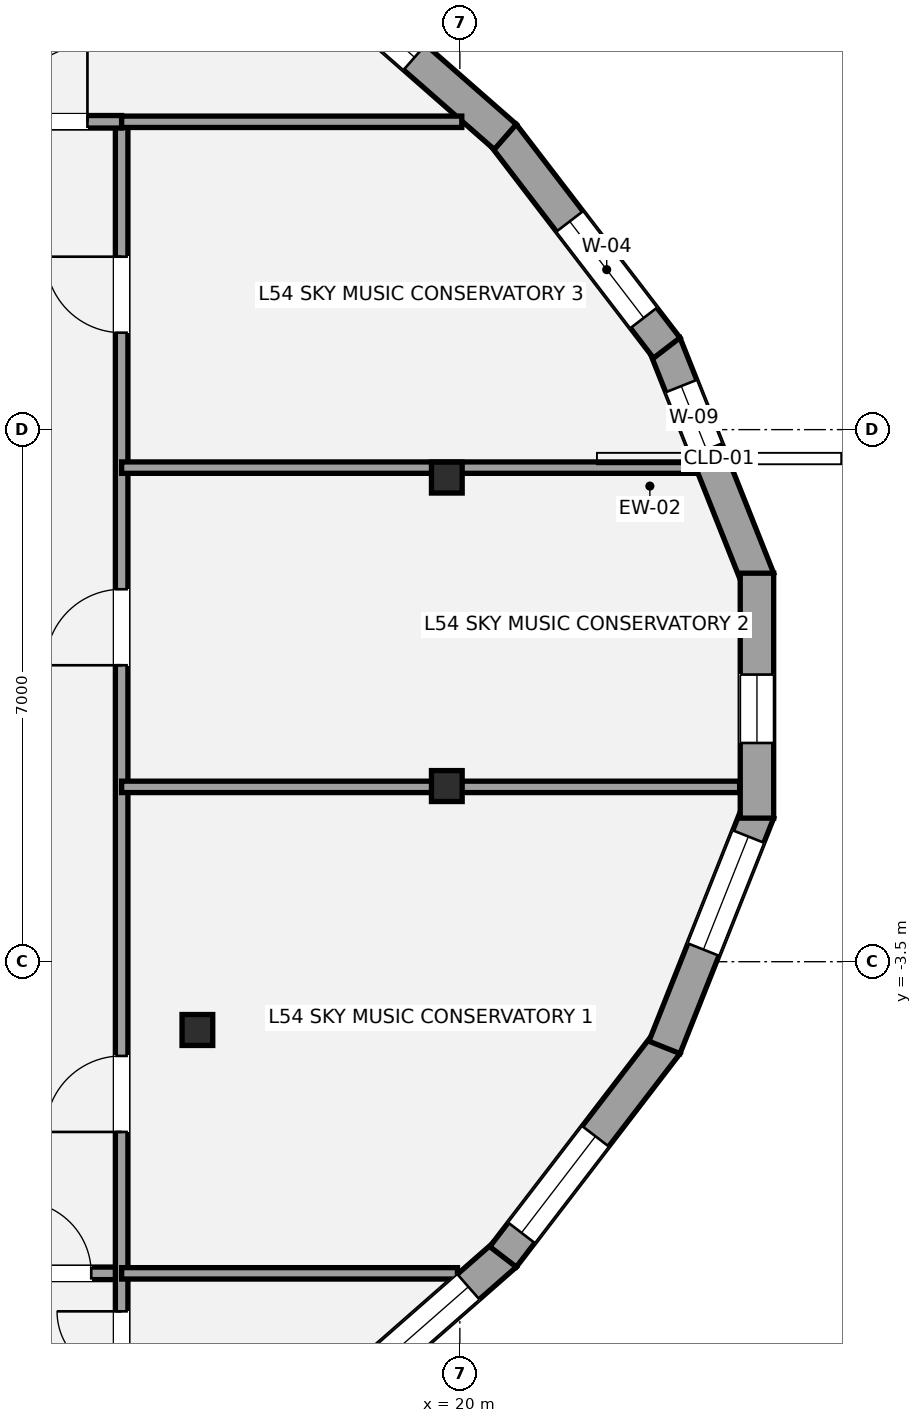
"""IFC4 building model, lengths in metres.
Left out: names, types, materials, properties, quantities, classifications, styles, units other than length and angle.
Written with IfcOpenShell. Run it as: python <this file> out.ifc"""

import sys

from ifc_helpers import new_model, si_unit, direction, frame, frame_2d, origin, origin_2d, place, context, subcontext, project, spatial, rectangle, i_section, extrude, element, fill, save


model = new_model("IFC4")
c1 = context("Model", 3, precision=1e-05, world=origin(), true_north=direction((0.0, 1.0)))
c2 = subcontext(c1, "Body", "Model", "MODEL_VIEW")
j1 = project(units=[si_unit("LENGTHUNIT", "METRE"), si_unit("PLANEANGLEUNIT", "RADIAN")], contexts=[c1])
p1 = place(None, origin())
s1 = spatial("IfcSite", under=j1, at=p1, CompositionType="ELEMENT")
p2 = place(p1, origin())
s2 = spatial("IfcBuilding", under=s1, at=p2, CompositionType="ELEMENT")
p3 = place(p2, frame((0.0, 0.0, 195.0)))
s3 = spatial("IfcBuildingStorey", under=s2, at=p3, CompositionType="ELEMENT", Elevation=195.0)
for number, where, z_axis, x_axis in (
    (1, (19.828, 2.869, 0.0), (0.0, 0.0, 1.0), (1.0, 0.0, 0.0)),
    (2, (16.547, -4.398, 0.0), (0.0, 0.0, 1.0), (1.0, 0.0, 0.0)),
    (3, (19.828, -1.189, 0.0), (0.0, 0.0, 1.0), (1.0, 0.0, 0.0)),
):
    element("IfcColumn", number, at=place(p3, frame(where, z_axis=z_axis, x_axis=x_axis)), inside=s3, PredefinedType="COLUMN", context=c2, shape_type="SweptSolid", body=[
        extrude(i_section(OverallWidth=0.404, OverallDepth=0.407, WebThickness=0.027, FlangeThickness=0.044, at=origin_2d()), origin(), (0.0, 0.0, 1.0), 3.2),
    ])
p4 = place(p3, frame((22.692, 4.627, 0.0), z_axis=(0.0, 0.0, 1.0), x_axis=(0.369672887509, -0.929161964483, 0.0)))
e4 = element("IfcWall", 4, at=p4, inside=s3, PredefinedType="STANDARD", context=c2, shape_type="SweptSolid", body=[
    extrude(rectangle(XDim=3.334, YDim=0.44, at=frame_2d((1.667, 0.0))), origin(), (0.0, 0.0, 1.0), 2.315),
])
p5 = place(p4, frame((0.597, 0.0, 0.58)))
e5 = element("IfcOpeningElement", 5, at=p5, cuts=e4, PredefinedType="OPENING", context=c2, shape_type="SweptSolid", body=[
    extrude(rectangle(XDim=0.9, YDim=1.35, at=frame_2d((0.45, 0.675))), frame((0.0, 0.23, 0.0), z_axis=(0.0, -1.0, 0.0), x_axis=(1.0, 0.0, 0.0)), (0.0, 0.0, 1.0), 0.46),
])
p6 = place(p3, frame((20.568, 7.383, 0.0), z_axis=(0.0, 0.0, 1.0), x_axis=(0.608586512644, -0.793487527708, 0.0)))
e6 = element("IfcWall", 6, at=p6, inside=s3, PredefinedType="STANDARD", context=c2, shape_type="SweptSolid", body=[
    extrude(rectangle(XDim=3.539, YDim=0.44, at=frame_2d((1.769, 0.0))), origin(), (0.0, 0.0, 1.0), 2.315),
])
p7 = place(p6, frame((1.441, 0.0, 0.58)))
e7 = element("IfcOpeningElement", 7, at=p7, cuts=e6, PredefinedType="OPENING", context=c2, shape_type="SweptSolid", body=[
    extrude(rectangle(XDim=1.6, YDim=1.55, at=frame_2d((0.8, 0.775))), frame((0.0, 0.23, 0.0), z_axis=(0.0, -1.0, 0.0), x_axis=(1.0, 0.0, 0.0)), (0.0, 0.0, 1.0), 0.46),
])
p8 = place(p3, frame((17.79, 9.813, 0.0), z_axis=(0.0, 0.0, 1.0), x_axis=(0.751936480142, -0.65923556475, 0.0)))
e8 = element("IfcWall", 8, at=p8, inside=s3, PredefinedType="STANDARD", context=c2, shape_type="SweptSolid", body=[
    extrude(rectangle(XDim=3.735, YDim=0.44, at=frame_2d((1.867, 0.0))), origin(), (0.0, 0.0, 1.0), 2.315),
])
p9 = place(p8, frame((0.547, 0.0, 0.58)))
e9 = element("IfcOpeningElement", 9, at=p9, cuts=e8, PredefinedType="OPENING", context=c2, shape_type="SweptSolid", body=[
    extrude(rectangle(XDim=1.6, YDim=1.55, at=frame_2d((0.8, 0.775))), frame((0.0, 0.23, 0.0), z_axis=(0.0, -1.0, 0.0), x_axis=(1.0, 0.0, 0.0)), (0.0, 0.0, 1.0), 0.46),
])
p10 = place(p3, frame((20.598, -7.351, 0.0), z_axis=(0.0, 0.0, 1.0), x_axis=(-0.751936480142, -0.65923556475, 0.0)))
e10 = element("IfcWall", 10, at=p10, inside=s3, PredefinedType="STANDARD", context=c2, shape_type="SweptSolid", body=[
    extrude(rectangle(XDim=3.735, YDim=0.44, at=frame_2d((1.867, 0.0))), origin(), (0.0, 0.0, 1.0), 2.315),
])
p11 = place(p10, frame((0.646, 0.0, 0.48)))
e11 = element("IfcOpeningElement", 11, at=p11, cuts=e10, PredefinedType="OPENING", context=c2, shape_type="SweptSolid", body=[
    extrude(rectangle(XDim=1.6, YDim=1.55, at=frame_2d((0.8, 0.775))), frame((0.0, 0.23, 0.0), z_axis=(0.0, -1.0, 0.0), x_axis=(1.0, 0.0, 0.0)), (0.0, 0.0, 1.0), 0.46),
])
p12 = place(p3, frame((22.722, -4.575, 0.0), z_axis=(0.0, 0.0, 1.0), x_axis=(-0.608586512644, -0.793487527708, 0.0)))
e12 = element("IfcWall", 12, at=p12, inside=s3, PredefinedType="STANDARD", context=c2, shape_type="SweptSolid", body=[
    extrude(rectangle(XDim=3.539, YDim=0.44, at=frame_2d((1.769, 0.0))), origin(), (0.0, 0.0, 1.0), 2.315),
])
p13 = place(p12, frame((1.54, 0.0, 0.58)))
e13 = element("IfcOpeningElement", 13, at=p13, cuts=e12, PredefinedType="OPENING", context=c2, shape_type="SweptSolid", body=[
    extrude(rectangle(XDim=1.6, YDim=1.55, at=frame_2d((0.8, 0.775))), frame((0.0, 0.23, 0.0), z_axis=(0.0, -1.0, 0.0), x_axis=(1.0, 0.0, 0.0)), (0.0, 0.0, 1.0), 0.46),
])
p14 = place(p3, frame((23.925, -1.53, 0.0), z_axis=(0.0, 0.0, 1.0), x_axis=(-0.369672887509, -0.929161964483, 0.0)))
e14 = element("IfcWall", 14, at=p14, inside=s3, PredefinedType="STANDARD", context=c2, shape_type="SweptSolid", body=[
    extrude(rectangle(XDim=3.334, YDim=0.44, at=frame_2d((1.667, 0.0))), origin(), (0.0, 0.0, 1.0), 2.315),
])
p15 = place(p14, frame((0.348, 0.0, 0.58)))
e15 = element("IfcOpeningElement", 15, at=p15, cuts=e14, PredefinedType="OPENING", context=c2, shape_type="SweptSolid", body=[
    extrude(rectangle(XDim=1.6, YDim=1.55, at=frame_2d((0.8, 0.775))), frame((0.0, 0.23, 0.0), z_axis=(0.0, -1.0, 0.0), x_axis=(1.0, 0.0, 0.0)), (0.0, 0.0, 1.0), 0.46),
])
p16 = place(p3, frame((23.909, 1.611, 0.0), z_axis=(0.0, 0.0, 1.0), x_axis=(0.0, -1.0, 0.0)))
e16 = element("IfcWall", 16, at=p16, inside=s3, PredefinedType="STANDARD", context=c2, shape_type="SweptSolid", body=[
    extrude(rectangle(XDim=3.222, YDim=0.44, at=frame_2d((1.611, 0.0))), origin(), (0.0, 0.0, 1.0), 2.315),
])
p17 = place(p16, frame((1.334, 0.0, 0.58)))
e17 = element("IfcOpeningElement", 17, at=p17, cuts=e16, PredefinedType="OPENING", context=c2, shape_type="SweptSolid", body=[
    extrude(rectangle(XDim=0.9, YDim=1.35, at=frame_2d((0.45, 0.675))), frame((0.0, 0.23, 0.0), z_axis=(0.0, -1.0, 0.0), x_axis=(1.0, 0.0, 0.0)), (0.0, 0.0, 1.0), 0.46),
])
p18 = place(p3, frame((-14.878, -7.6, 0.0), z_axis=(0.0, 0.0, 1.0), x_axis=(1.0, 0.0, 0.0)))
e18 = element("IfcWall", 18, at=p18, inside=s3, PredefinedType="PARTITIONING", context=c2, shape_type="SweptSolid", body=[
    extrude(rectangle(XDim=30.428, YDim=0.165, at=frame_2d((15.214, 0.0))), origin(), (0.0, 0.0, 1.0), 2.398),
])
p19 = place(p18, frame((6.028, 0.0, 0.0)))
e19 = element("IfcOpeningElement", 19, at=p19, cuts=e18, PredefinedType="OPENING", context=c2, shape_type="SweptSolid", body=[
    extrude(rectangle(XDim=0.85, YDim=2.1, at=frame_2d((0.425, 1.05))), frame((0.0, 0.093, 0.0), z_axis=(0.0, -1.0, 0.0), x_axis=(1.0, 0.0, 0.0)), (0.0, 0.0, 1.0), 0.185),
])
p20 = place(p18, frame((29.078, 0.0, 0.0)))
e20 = element("IfcOpeningElement", 20, at=p20, cuts=e18, PredefinedType="OPENING", context=c2, shape_type="SweptSolid", body=[
    extrude(rectangle(XDim=0.95, YDim=2.15, at=frame_2d((0.475, 1.075))), frame((0.0, 0.093, 0.0), z_axis=(0.0, -1.0, 0.0), x_axis=(1.0, 0.0, 0.0)), (0.0, 0.0, 1.0), 0.185),
])
p21 = place(p3, frame((15.55, -11.054, 0.0), z_axis=(0.0, 0.0, 1.0), x_axis=(0.0, 1.0, 0.0)))
e21 = element("IfcWall", 21, at=p21, inside=s3, PredefinedType="PARTITIONING", context=c2, shape_type="SweptSolid", body=[
    extrude(rectangle(XDim=18.604, YDim=0.165, at=frame_2d((9.302, 0.0))), origin(), (0.0, 0.0, 1.0), 2.473),
])
p22 = place(p21, frame((2.104, 0.0, 0.0)))
e22 = element("IfcOpeningElement", 22, at=p22, cuts=e21, PredefinedType="OPENING", context=c2, shape_type="SweptSolid", body=[
    extrude(rectangle(XDim=0.85, YDim=2.1, at=frame_2d((0.425, 1.05))), frame((0.0, 0.093, 0.0), z_axis=(0.0, -1.0, 0.0), x_axis=(1.0, 0.0, 0.0)), (0.0, 0.0, 1.0), 0.185),
])
p23 = place(p21, frame((5.314, 0.0, 0.0)))
e23 = element("IfcOpeningElement", 23, at=p23, cuts=e21, PredefinedType="OPENING", context=c2, shape_type="SweptSolid", body=[
    extrude(rectangle(XDim=1.0, YDim=2.15, at=frame_2d((0.5, 1.075))), frame((0.0, 0.093, 0.0), z_axis=(0.0, -1.0, 0.0), x_axis=(1.0, 0.0, 0.0)), (0.0, 0.0, 1.0), 0.185),
])
p24 = place(p21, frame((11.455, 0.0, 0.0)))
e24 = element("IfcOpeningElement", 24, at=p24, cuts=e21, PredefinedType="OPENING", context=c2, shape_type="SweptSolid", body=[
    extrude(rectangle(XDim=1.0, YDim=2.15, at=frame_2d((0.5, 1.075))), frame((0.0, 0.093, 0.0), z_axis=(0.0, -1.0, 0.0), x_axis=(1.0, 0.0, 0.0)), (0.0, 0.0, 1.0), 0.185),
])
p25 = place(p21, frame((15.83, 0.0, 0.0)))
e25 = element("IfcOpeningElement", 25, at=p25, cuts=e21, PredefinedType="OPENING", context=c2, shape_type="SweptSolid", body=[
    extrude(rectangle(XDim=1.0, YDim=2.15, at=frame_2d((0.5, 1.075))), frame((0.0, 0.093, 0.0), z_axis=(0.0, -1.0, 0.0), x_axis=(1.0, 0.0, 0.0)), (0.0, 0.0, 1.0), 0.185),
])
p26 = place(p3, frame((13.8, 7.55, 0.0), z_axis=(0.0, 0.0, 1.0), x_axis=(1.0, 0.0, 0.0)))
e26 = element("IfcWall", 26, at=p26, inside=s3, PredefinedType="PARTITIONING", context=c2, shape_type="SweptSolid", body=[
    extrude(rectangle(XDim=1.75, YDim=0.165, at=frame_2d((0.875, 0.0))), origin(), (0.0, 0.0, 1.0), 3.02),
])
p27 = place(p26, frame((0.3, 0.0, 0.0)))
e27 = element("IfcOpeningElement", 27, at=p27, cuts=e26, PredefinedType="OPENING", context=c2, shape_type="SweptSolid", body=[
    extrude(rectangle(XDim=1.0, YDim=2.15, at=frame_2d((0.5, 1.075))), frame((0.0, 0.093, 0.0), z_axis=(0.0, -1.0, 0.0), x_axis=(1.0, 0.0, 0.0)), (0.0, 0.0, 1.0), 0.185),
])
p28 = place(p3, frame((15.55, 7.55, 0.0), z_axis=(0.0, 0.0, 1.0), x_axis=(1.0, 0.0, 0.0)))
e28 = element("IfcWall", 28, at=p28, inside=s3, PredefinedType="PLUMBINGWALL", context=c2, shape_type="SweptSolid", body=[
    extrude(rectangle(XDim=4.475, YDim=0.15, at=frame_2d((2.238, 0.0))), origin(), (0.0, 0.0, 1.0), 2.473),
])
p29 = place(p3, frame((15.55, -7.6, 0.0), z_axis=(0.0, 0.0, 1.0), x_axis=(1.0, 0.0, 0.0)))
e29 = element("IfcWall", 29, at=p29, inside=s3, PredefinedType="PLUMBINGWALL", context=c2, shape_type="SweptSolid", body=[
    extrude(rectangle(XDim=4.418, YDim=0.15, at=frame_2d((2.209, 0.0))), origin(), (0.0, 0.0, 1.0), 2.473),
])
p30 = place(p3, frame((15.55, -1.2, 0.0), z_axis=(0.0, 0.0, 1.0), x_axis=(1.0, 0.0, 0.0)))
e30 = element("IfcWall", 30, at=p30, inside=s3, PredefinedType="PLUMBINGWALL", context=c2, shape_type="SweptSolid", body=[
    extrude(rectangle(XDim=8.131, YDim=0.15, at=frame_2d((4.065, 0.0))), origin(), (0.0, 0.0, 1.0), 2.398),
])
p31 = place(p3, frame((15.55, 3.0, 0.0), z_axis=(0.0, 0.0, 1.0), x_axis=(1.0, 0.0, 0.0)))
e31 = element("IfcWall", 31, at=p31, inside=s3, PredefinedType="PLUMBINGWALL", context=c2, shape_type="SweptSolid", body=[
    extrude(rectangle(XDim=7.544, YDim=0.15, at=frame_2d((3.772, 0.0))), origin(), (0.0, 0.0, 1.0), 2.473),
])
p32 = place(p5, origin())
e32 = element("IfcWindow", 32, at=p32, inside=s3, PartitioningType="SINGLE_PANEL", PredefinedType="WINDOW", context=c2, shape_type="SweptSolid", body=[
    extrude(rectangle(XDim=0.9, YDim=1.35, at=frame_2d((0.45, 0.675))), frame((0.0, -0.01, 0.0), z_axis=(0.0, -1.0, 0.0), x_axis=(1.0, 0.0, 0.0)), (0.0, 0.0, 1.0), 0.06),
])
fill(e5, e32)
p33 = place(p7, origin())
e33 = element("IfcWindow", 33, at=p33, inside=s3, PartitioningType="SINGLE_PANEL", PredefinedType="WINDOW", context=c2, shape_type="SweptSolid", body=[
    extrude(rectangle(XDim=1.6, YDim=1.55, at=frame_2d((0.8, 0.775))), frame((0.0, -0.01, 0.0), z_axis=(0.0, -1.0, 0.0), x_axis=(1.0, 0.0, 0.0)), (0.0, 0.0, 1.0), 0.06),
])
fill(e7, e33)
p34 = place(p9, origin())
e34 = element("IfcWindow", 34, at=p34, inside=s3, PartitioningType="SINGLE_PANEL", PredefinedType="WINDOW", context=c2, shape_type="SweptSolid", body=[
    extrude(rectangle(XDim=1.6, YDim=1.55, at=frame_2d((0.8, 0.775))), frame((0.0, -0.01, 0.0), z_axis=(0.0, -1.0, 0.0), x_axis=(1.0, 0.0, 0.0)), (0.0, 0.0, 1.0), 0.06),
])
fill(e9, e34)
p35 = place(p11, origin())
e35 = element("IfcWindow", 35, at=p35, inside=s3, PartitioningType="SINGLE_PANEL", PredefinedType="WINDOW", context=c2, shape_type="SweptSolid", body=[
    extrude(rectangle(XDim=1.6, YDim=1.55, at=frame_2d((0.8, 0.775))), frame((0.0, -0.01, 0.0), z_axis=(0.0, -1.0, 0.0), x_axis=(1.0, 0.0, 0.0)), (0.0, 0.0, 1.0), 0.06),
])
fill(e11, e35)
p36 = place(p13, origin())
e36 = element("IfcWindow", 36, at=p36, inside=s3, PartitioningType="SINGLE_PANEL", PredefinedType="WINDOW", context=c2, shape_type="SweptSolid", body=[
    extrude(rectangle(XDim=1.6, YDim=1.55, at=frame_2d((0.8, 0.775))), frame((0.0, -0.01, 0.0), z_axis=(0.0, -1.0, 0.0), x_axis=(1.0, 0.0, 0.0)), (0.0, 0.0, 1.0), 0.06),
])
fill(e13, e36)
p37 = place(p15, origin())
e37 = element("IfcWindow", 37, at=p37, inside=s3, PartitioningType="SINGLE_PANEL", PredefinedType="WINDOW", context=c2, shape_type="SweptSolid", body=[
    extrude(rectangle(XDim=1.6, YDim=1.55, at=frame_2d((0.8, 0.775))), frame((0.0, -0.01, 0.0), z_axis=(0.0, -1.0, 0.0), x_axis=(1.0, 0.0, 0.0)), (0.0, 0.0, 1.0), 0.06),
])
fill(e15, e37)
p38 = place(p17, origin())
e38 = element("IfcWindow", 38, at=p38, inside=s3, PartitioningType="SINGLE_PANEL", PredefinedType="WINDOW", context=c2, shape_type="SweptSolid", body=[
    extrude(rectangle(XDim=0.9, YDim=1.35, at=frame_2d((0.45, 0.675))), frame((0.0, -0.01, 0.0), z_axis=(0.0, -1.0, 0.0), x_axis=(1.0, 0.0, 0.0)), (0.0, 0.0, 1.0), 0.06),
])
fill(e17, e38)
p39 = place(p27, origin())
e39 = element("IfcDoor", 39, at=p39, inside=s3, OperationType="SINGLE_SWING_RIGHT", PredefinedType="DOOR", context=c2, shape_type="SweptSolid", body=[
    extrude(rectangle(XDim=1.0, YDim=2.15, at=frame_2d((0.5, 1.075))), frame((0.0, 0.025, 0.0), z_axis=(0.0, -1.0, 0.0), x_axis=(1.0, 0.0, 0.0)), (0.0, 0.0, 1.0), 0.05),
])
fill(e27, e39)
p40 = place(p22, origin())
e40 = element("IfcDoor", 40, at=p40, inside=s3, OperationType="SINGLE_SWING_RIGHT", PredefinedType="DOOR", context=c2, shape_type="SweptSolid", body=[
    extrude(rectangle(XDim=0.85, YDim=2.1, at=frame_2d((0.425, 1.05))), frame((0.0, 0.025, 0.0), z_axis=(0.0, -1.0, 0.0), x_axis=(1.0, 0.0, 0.0)), (0.0, 0.0, 1.0), 0.05),
])
fill(e22, e40)
p41 = place(p20, origin())
e41 = element("IfcDoor", 41, at=p41, inside=s3, OperationType="SINGLE_SWING_LEFT", PredefinedType="DOOR", context=c2, shape_type="SweptSolid", body=[
    extrude(rectangle(XDim=0.95, YDim=2.15, at=frame_2d((0.475, 1.075))), frame((0.0, 0.025, 0.0), z_axis=(0.0, -1.0, 0.0), x_axis=(1.0, 0.0, 0.0)), (0.0, 0.0, 1.0), 0.05),
])
fill(e20, e41)
p42 = place(p23, origin())
e42 = element("IfcDoor", 42, at=p42, inside=s3, OperationType="SINGLE_SWING_LEFT", PredefinedType="DOOR", context=c2, shape_type="SweptSolid", body=[
    extrude(rectangle(XDim=1.0, YDim=2.15, at=frame_2d((0.5, 1.075))), frame((0.0, 0.025, 0.0), z_axis=(0.0, -1.0, 0.0), x_axis=(1.0, 0.0, 0.0)), (0.0, 0.0, 1.0), 0.05),
])
fill(e23, e42)
p43 = place(p24, origin())
e43 = element("IfcDoor", 43, at=p43, inside=s3, OperationType="SINGLE_SWING_LEFT", PredefinedType="DOOR", context=c2, shape_type="SweptSolid", body=[
    extrude(rectangle(XDim=1.0, YDim=2.15, at=frame_2d((0.5, 1.075))), frame((0.0, 0.025, 0.0), z_axis=(0.0, -1.0, 0.0), x_axis=(1.0, 0.0, 0.0)), (0.0, 0.0, 1.0), 0.05),
])
fill(e24, e43)
p44 = place(p25, origin())
e44 = element("IfcDoor", 44, at=p44, inside=s3, OperationType="SINGLE_SWING_RIGHT", PredefinedType="DOOR", context=c2, shape_type="SweptSolid", body=[
    extrude(rectangle(XDim=1.0, YDim=2.15, at=frame_2d((0.5, 1.075))), frame((0.0, 0.025, 0.0), z_axis=(0.0, -1.0, 0.0), x_axis=(1.0, 0.0, 0.0)), (0.0, 0.0, 1.0), 0.05),
])
fill(e25, e44)
save(model, sys.argv[1])
